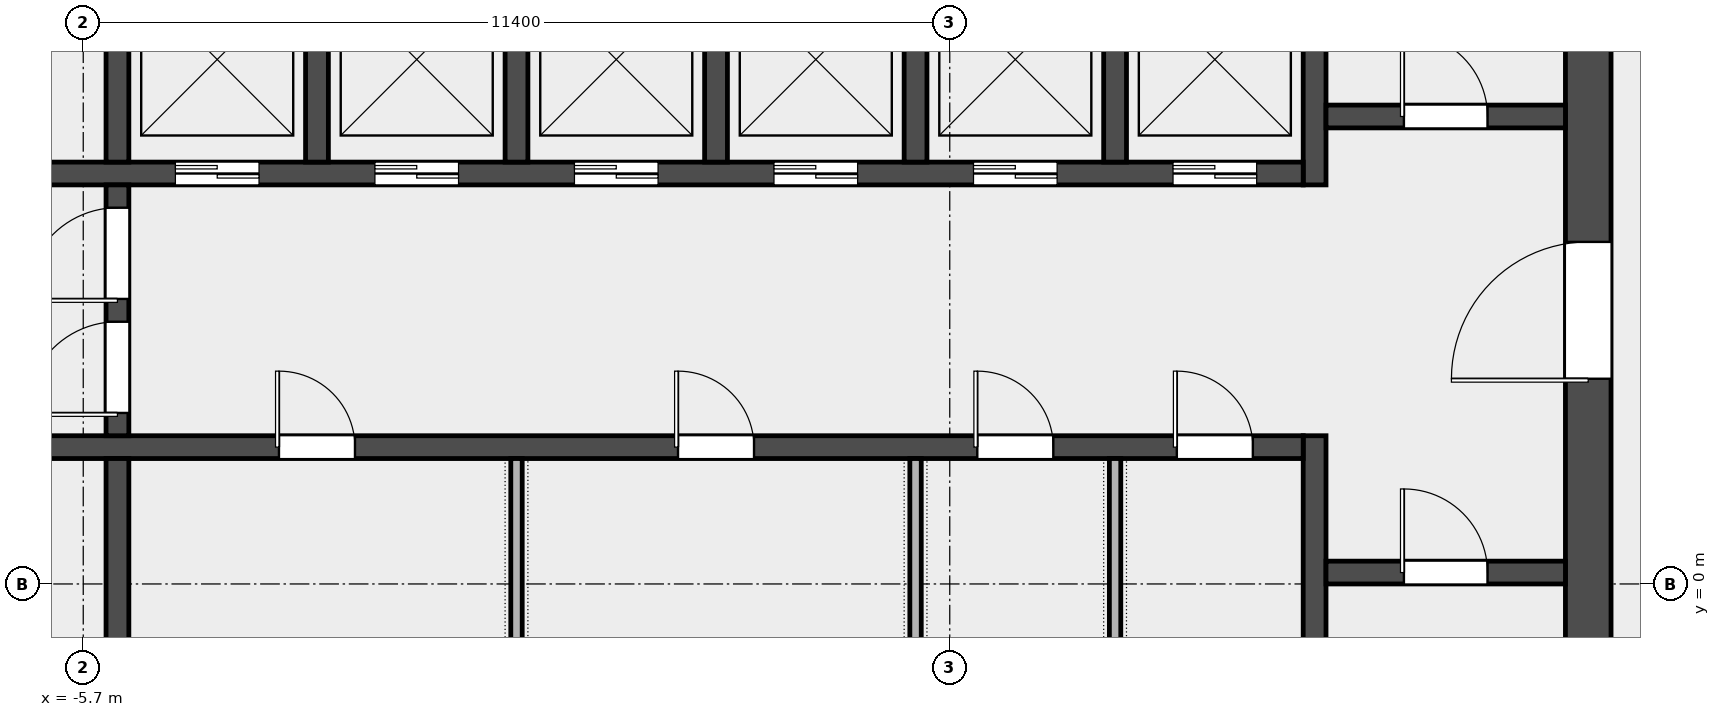
"""IFC4 building model, lengths in metres.
Left out: names, types, materials, properties, quantities, classifications, styles, units other than length and angle.
Written with IfcOpenShell. Run it as: python <this file> out.ifc"""

import sys

from ifc_helpers import new_model, si_unit, direction, frame, frame_2d, origin, place, context, subcontext, project, spatial, rectangle, extrude, element, fill, save


model = new_model("IFC4")
c1 = context("Model", 3, precision=1e-05, world=origin(), true_north=direction((0.0, 1.0)))
c2 = subcontext(c1, "Body", "Model", "MODEL_VIEW")
j1 = project(units=[si_unit("LENGTHUNIT", "METRE"), si_unit("PLANEANGLEUNIT", "RADIAN")], contexts=[c1])
p1 = place(None, origin())
s1 = spatial("IfcSite", under=j1, at=p1, CompositionType="ELEMENT")
p2 = place(p1, origin())
s2 = spatial("IfcBuilding", under=s1, at=p2, CompositionType="ELEMENT")
p3 = place(p2, frame((0.0, 0.0, 211.0)))
s3 = spatial("IfcBuildingStorey", under=s2, at=p3, CompositionType="ELEMENT", Elevation=211.0)
p4 = place(p3, frame((14.1, -6.6, 0.0), z_axis=(0.0, 0.0, 1.0), x_axis=(0.0, 1.0, 0.0)))
e1 = element("IfcWall", 1, at=p4, inside=s3, PredefinedType="SHEAR", context=c2, shape_type="SweptSolid", body=[
    extrude(rectangle(XDim=19.5, YDim=0.6, at=frame_2d((9.75, 0.0))), origin(), (0.0, 0.0, 1.0), 3.7),
])
p5 = place(p4, frame((9.3, 0.0, 0.0)))
e2 = element("IfcOpeningElement", 2, at=p5, cuts=e1, PredefinedType="OPENING", context=c2, shape_type="SweptSolid", body=[
    extrude(rectangle(XDim=1.8, YDim=2.1, at=frame_2d((0.9, 1.05))), frame((0.0, 0.312, 0.0), z_axis=(0.0, -1.0, 0.0), x_axis=(1.0, 0.0, 0.0)), (0.0, 0.0, 1.0), 0.624),
])
p6 = place(p3, frame((10.5, -6.6, 0.0), z_axis=(0.0, 0.0, 1.0), x_axis=(0.0, 1.0, 0.0)))
e3 = element("IfcWall", 3, at=p6, inside=s3, PredefinedType="SHEAR", context=c2, shape_type="SweptSolid", body=[
    extrude(rectangle(XDim=8.55, YDim=0.3, at=frame_2d((4.275, 0.0))), origin(), (0.0, 0.0, 1.0), 3.7),
])
p7 = place(p3, frame((10.5, 5.25, 0.0), z_axis=(0.0, 0.0, 1.0), x_axis=(0.0, 1.0, 0.0)))
e4 = element("IfcWall", 4, at=p7, inside=s3, PredefinedType="SHEAR", context=c2, shape_type="SweptSolid", body=[
    extrude(rectangle(XDim=7.65, YDim=0.3, at=frame_2d((3.825, 0.0))), origin(), (0.0, 0.0, 1.0), 3.7),
])
p8 = place(p3, frame((10.65, 0.15, 0.0), z_axis=(0.0, 0.0, 1.0), x_axis=(1.0, 0.0, 0.0)))
e5 = element("IfcWall", 5, at=p8, inside=s3, PredefinedType="SOLIDWALL", context=c2, shape_type="SweptSolid", body=[
    extrude(rectangle(XDim=3.15, YDim=0.3, at=frame_2d((1.575, 0.0))), origin(), (0.0, 0.0, 1.0), 3.7),
])
p9 = place(p8, frame((1.025, 0.0, 0.0)))
e6 = element("IfcOpeningElement", 6, at=p9, cuts=e5, PredefinedType="OPENING", context=c2, shape_type="SweptSolid", body=[
    extrude(rectangle(XDim=1.1, YDim=2.1, at=frame_2d((0.55, 1.05))), frame((0.0, 0.162, 0.0), z_axis=(0.0, -1.0, 0.0), x_axis=(1.0, 0.0, 0.0)), (0.0, 0.0, 1.0), 0.324),
])
p10 = place(p3, frame((10.65, 6.15, 0.0), z_axis=(0.0, 0.0, 1.0), x_axis=(1.0, 0.0, 0.0)))
e7 = element("IfcWall", 7, at=p10, inside=s3, PredefinedType="SOLIDWALL", context=c2, shape_type="SweptSolid", body=[
    extrude(rectangle(XDim=3.15, YDim=0.3, at=frame_2d((1.575, 0.0))), origin(), (0.0, 0.0, 1.0), 3.7),
])
p11 = place(p10, frame((1.025, 0.0, 0.0)))
e8 = element("IfcOpeningElement", 8, at=p11, cuts=e7, PredefinedType="OPENING", context=c2, shape_type="SweptSolid", body=[
    extrude(rectangle(XDim=1.1, YDim=2.1, at=frame_2d((0.55, 1.05))), frame((0.0, 0.162, 0.0), z_axis=(0.0, -1.0, 0.0), x_axis=(1.0, 0.0, 0.0)), (0.0, 0.0, 1.0), 0.324),
])
p12 = place(p3, frame((-10.35, 1.8, 0.0), z_axis=(0.0, 0.0, 1.0), x_axis=(1.0, 0.0, 0.0)))
e9 = element("IfcWall", 9, at=p12, inside=s3, PredefinedType="SOLIDWALL", context=c2, shape_type="SweptSolid", body=[
    extrude(rectangle(XDim=20.7, YDim=0.3, at=frame_2d((10.35, 0.0))), origin(), (0.0, 0.0, 1.0), 3.7),
])
p13 = place(p12, frame((0.512, 0.0, 0.0)))
e10 = element("IfcOpeningElement", 10, at=p13, cuts=e9, PredefinedType="OPENING", context=c2, shape_type="SweptSolid", body=[
    extrude(rectangle(XDim=1.3, YDim=2.1, at=frame_2d((0.65, 1.05))), frame((0.0, 0.162, 0.0), z_axis=(0.0, -1.0, 0.0), x_axis=(1.0, 0.0, 0.0)), (0.0, 0.0, 1.0), 0.324),
])
p14 = place(p12, frame((7.225, 0.0, 0.0)))
e11 = element("IfcOpeningElement", 11, at=p14, cuts=e9, PredefinedType="OPENING", context=c2, shape_type="SweptSolid", body=[
    extrude(rectangle(XDim=1.0, YDim=2.1, at=frame_2d((0.5, 1.05))), frame((0.0, 0.162, 0.0), z_axis=(0.0, -1.0, 0.0), x_axis=(1.0, 0.0, 0.0)), (0.0, 0.0, 1.0), 0.324),
])
p15 = place(p12, frame((12.475, 0.0, 0.0)))
e12 = element("IfcOpeningElement", 12, at=p15, cuts=e9, PredefinedType="OPENING", context=c2, shape_type="SweptSolid", body=[
    extrude(rectangle(XDim=1.0, YDim=2.1, at=frame_2d((0.5, 1.05))), frame((0.0, 0.162, 0.0), z_axis=(0.0, -1.0, 0.0), x_axis=(1.0, 0.0, 0.0)), (0.0, 0.0, 1.0), 0.324),
])
p16 = place(p12, frame((16.413, 0.0, 0.0)))
e13 = element("IfcOpeningElement", 13, at=p16, cuts=e9, PredefinedType="OPENING", context=c2, shape_type="SweptSolid", body=[
    extrude(rectangle(XDim=1.0, YDim=2.1, at=frame_2d((0.5, 1.05))), frame((0.0, 0.162, 0.0), z_axis=(0.0, -1.0, 0.0), x_axis=(1.0, 0.0, 0.0)), (0.0, 0.0, 1.0), 0.324),
])
p17 = place(p12, frame((19.038, 0.0, 0.0)))
e14 = element("IfcOpeningElement", 14, at=p17, cuts=e9, PredefinedType="OPENING", context=c2, shape_type="SweptSolid", body=[
    extrude(rectangle(XDim=1.0, YDim=2.1, at=frame_2d((0.5, 1.05))), frame((0.0, 0.162, 0.0), z_axis=(0.0, -1.0, 0.0), x_axis=(1.0, 0.0, 0.0)), (0.0, 0.0, 1.0), 0.324),
])
p18 = place(p3, frame((-10.35, 5.4, 0.0), z_axis=(0.0, 0.0, 1.0), x_axis=(1.0, 0.0, 0.0)))
e15 = element("IfcWall", 15, at=p18, inside=s3, PredefinedType="SOLIDWALL", context=c2, shape_type="SweptSolid", body=[
    extrude(rectangle(XDim=20.7, YDim=0.3, at=frame_2d((10.35, 0.0))), origin(), (0.0, 0.0, 1.0), 3.7),
])
p19 = place(p18, frame((0.512, 0.0, 0.0)))
e16 = element("IfcOpeningElement", 16, at=p19, cuts=e15, PredefinedType="OPENING", context=c2, shape_type="SweptSolid", body=[
    extrude(rectangle(XDim=1.3, YDim=2.1, at=frame_2d((0.65, 1.05))), frame((0.0, 0.162, 0.0), z_axis=(0.0, -1.0, 0.0), x_axis=(1.0, 0.0, 0.0)), (0.0, 0.0, 1.0), 0.324),
])
p20 = place(p18, frame((5.863, 0.0, 0.0)))
e17 = element("IfcOpeningElement", 17, at=p20, cuts=e15, PredefinedType="OPENING", context=c2, shape_type="SweptSolid", body=[
    extrude(rectangle(XDim=1.1, YDim=2.1, at=frame_2d((0.55, 1.05))), frame((0.0, 0.162, 0.0), z_axis=(0.0, -1.0, 0.0), x_axis=(1.0, 0.0, 0.0)), (0.0, 0.0, 1.0), 0.324),
])
p21 = place(p18, frame((8.488, 0.0, 0.0)))
e18 = element("IfcOpeningElement", 18, at=p21, cuts=e15, PredefinedType="OPENING", context=c2, shape_type="SweptSolid", body=[
    extrude(rectangle(XDim=1.1, YDim=2.1, at=frame_2d((0.55, 1.05))), frame((0.0, 0.162, 0.0), z_axis=(0.0, -1.0, 0.0), x_axis=(1.0, 0.0, 0.0)), (0.0, 0.0, 1.0), 0.324),
])
p22 = place(p18, frame((11.113, 0.0, 0.0)))
e19 = element("IfcOpeningElement", 19, at=p22, cuts=e15, PredefinedType="OPENING", context=c2, shape_type="SweptSolid", body=[
    extrude(rectangle(XDim=1.1, YDim=2.1, at=frame_2d((0.55, 1.05))), frame((0.0, 0.162, 0.0), z_axis=(0.0, -1.0, 0.0), x_axis=(1.0, 0.0, 0.0)), (0.0, 0.0, 1.0), 0.324),
])
p23 = place(p18, frame((13.738, 0.0, 0.0)))
e20 = element("IfcOpeningElement", 20, at=p23, cuts=e15, PredefinedType="OPENING", context=c2, shape_type="SweptSolid", body=[
    extrude(rectangle(XDim=1.1, YDim=2.1, at=frame_2d((0.55, 1.05))), frame((0.0, 0.162, 0.0), z_axis=(0.0, -1.0, 0.0), x_axis=(1.0, 0.0, 0.0)), (0.0, 0.0, 1.0), 0.324),
])
p24 = place(p18, frame((16.363, 0.0, 0.0)))
e21 = element("IfcOpeningElement", 21, at=p24, cuts=e15, PredefinedType="OPENING", context=c2, shape_type="SweptSolid", body=[
    extrude(rectangle(XDim=1.1, YDim=2.1, at=frame_2d((0.55, 1.05))), frame((0.0, 0.162, 0.0), z_axis=(0.0, -1.0, 0.0), x_axis=(1.0, 0.0, 0.0)), (0.0, 0.0, 1.0), 0.324),
])
p25 = place(p18, frame((18.988, 0.0, 0.0)))
e22 = element("IfcOpeningElement", 22, at=p25, cuts=e15, PredefinedType="OPENING", context=c2, shape_type="SweptSolid", body=[
    extrude(rectangle(XDim=1.1, YDim=2.1, at=frame_2d((0.55, 1.05))), frame((0.0, 0.162, 0.0), z_axis=(0.0, -1.0, 0.0), x_axis=(1.0, 0.0, 0.0)), (0.0, 0.0, 1.0), 0.324),
])
for number, where, z_axis, x_axis in (
    (23, (-5.25, -1.05, 0.0), (0.0, 0.0, 1.0), (0.0, 1.0, 0.0)),
    (24, (-5.25, 5.55, 0.0), (0.0, 0.0, 1.0), (0.0, 1.0, 0.0)),
    (25, (-2.625, 5.55, 0.0), (0.0, 0.0, 1.0), (0.0, 1.0, 0.0)),
    (26, (0.0, 5.55, 0.0), (0.0, 0.0, 1.0), (0.0, 1.0, 0.0)),
    (27, (2.625, 5.55, 0.0), (0.0, 0.0, 1.0), (0.0, 1.0, 0.0)),
    (28, (5.25, 5.55, 0.0), (0.0, 0.0, 1.0), (0.0, 1.0, 0.0)),
    (29, (7.875, 5.55, 0.0), (0.0, 0.0, 1.0), (0.0, 1.0, 0.0)),
):
    element("IfcWall", number, at=place(p3, frame(where, z_axis=z_axis, x_axis=x_axis)), inside=s3, PredefinedType="SOLIDWALL", context=c2, shape_type="SweptSolid", body=[
        extrude(rectangle(XDim=2.7, YDim=0.3, at=frame_2d((1.35, 0.0))), origin(), (0.0, 0.0, 1.0), 3.7),
    ])
p26 = place(p3, frame((-5.25, 1.95, 0.0), z_axis=(0.0, 0.0, 1.0), x_axis=(0.0, 1.0, 0.0)))
e30 = element("IfcWall", 30, at=p26, inside=s3, PredefinedType="SOLIDWALL", context=c2, shape_type="SweptSolid", body=[
    extrude(rectangle(XDim=3.3, YDim=0.3, at=frame_2d((1.65, 0.0))), origin(), (0.0, 0.0, 1.0), 3.7),
])
p27 = place(p26, frame((0.3, 0.0, 0.0)))
e31 = element("IfcOpeningElement", 31, at=p27, cuts=e30, PredefinedType="OPENING", context=c2, shape_type="SweptSolid", body=[
    extrude(rectangle(XDim=1.2, YDim=2.1, at=frame_2d((0.6, 1.05))), frame((0.0, 0.162, 0.0), z_axis=(0.0, -1.0, 0.0), x_axis=(1.0, 0.0, 0.0)), (0.0, 0.0, 1.0), 0.324),
])
p28 = place(p26, frame((1.8, 0.0, 0.0)))
e32 = element("IfcOpeningElement", 32, at=p28, cuts=e30, PredefinedType="OPENING", context=c2, shape_type="SweptSolid", body=[
    extrude(rectangle(XDim=1.2, YDim=2.1, at=frame_2d((0.6, 1.05))), frame((0.0, 0.162, 0.0), z_axis=(0.0, -1.0, 0.0), x_axis=(1.0, 0.0, 0.0)), (0.0, 0.0, 1.0), 0.324),
])
for number, where, z_axis, x_axis in (
    (33, (0.0, -1.05, 0.0), (0.0, 0.0, 1.0), (0.0, 1.0, 0.0)),
    (34, (5.25, -1.05, 0.0), (0.0, 0.0, 1.0), (0.0, 1.0, 0.0)),
    (35, (7.875, -1.05, 0.0), (0.0, 0.0, 1.0), (0.0, 1.0, 0.0)),
):
    element("IfcWall", number, at=place(p3, frame(where, z_axis=z_axis, x_axis=x_axis)), inside=s3, PredefinedType="PARTITIONING", context=c2, shape_type="SweptSolid", body=[
        extrude(rectangle(XDim=2.7, YDim=0.15, at=frame_2d((1.35, 0.0))), origin(), (0.0, 0.0, 1.0), 3.7),
    ])
p29 = place(p9, origin())
e36 = element("IfcDoor", 36, at=p29, inside=s3, OperationType="SINGLE_SWING_RIGHT", PredefinedType="DOOR", context=c2, shape_type="SweptSolid", body=[
    extrude(rectangle(XDim=1.1, YDim=2.1, at=frame_2d((0.55, 1.05))), frame((0.0, 0.025, 0.0), z_axis=(0.0, -1.0, 0.0), x_axis=(1.0, 0.0, 0.0)), (0.0, 0.0, 1.0), 0.05),
])
fill(e6, e36)
p30 = place(p11, origin())
e37 = element("IfcDoor", 37, at=p30, inside=s3, OperationType="SINGLE_SWING_RIGHT", PredefinedType="DOOR", context=c2, shape_type="SweptSolid", body=[
    extrude(rectangle(XDim=1.1, YDim=2.1, at=frame_2d((0.55, 1.05))), frame((0.0, 0.025, 0.0), z_axis=(0.0, -1.0, 0.0), x_axis=(1.0, 0.0, 0.0)), (0.0, 0.0, 1.0), 0.05),
])
fill(e8, e37)
p31 = place(p5, origin())
e38 = element("IfcDoor", 38, at=p31, inside=s3, OperationType="DOUBLE_DOOR_SINGLE_SWING", PredefinedType="DOOR", context=c2, shape_type="SweptSolid", body=[
    extrude(rectangle(XDim=1.8, YDim=2.1, at=frame_2d((0.9, 1.05))), frame((0.0, 0.025, 0.0), z_axis=(0.0, -1.0, 0.0), x_axis=(1.0, 0.0, 0.0)), (0.0, 0.0, 1.0), 0.05),
])
fill(e2, e38)
p32 = place(p27, origin())
e39 = element("IfcDoor", 39, at=p32, inside=s3, OperationType="SINGLE_SWING_LEFT", PredefinedType="DOOR", context=c2, shape_type="SweptSolid", body=[
    extrude(rectangle(XDim=1.2, YDim=2.1, at=frame_2d((0.6, 1.05))), frame((0.0, 0.025, 0.0), z_axis=(0.0, -1.0, 0.0), x_axis=(1.0, 0.0, 0.0)), (0.0, 0.0, 1.0), 0.05),
])
fill(e31, e39)
p33 = place(p28, origin())
e40 = element("IfcDoor", 40, at=p33, inside=s3, OperationType="SINGLE_SWING_RIGHT", PredefinedType="DOOR", context=c2, shape_type="SweptSolid", body=[
    extrude(rectangle(XDim=1.2, YDim=2.1, at=frame_2d((0.6, 1.05))), frame((0.0, 0.025, 0.0), z_axis=(0.0, -1.0, 0.0), x_axis=(1.0, 0.0, 0.0)), (0.0, 0.0, 1.0), 0.05),
])
fill(e32, e40)
p34 = place(p20, origin())
e41 = element("IfcDoor", 41, at=p34, inside=s3, OperationType="DOUBLE_DOOR_SLIDING", PredefinedType="DOOR", context=c2, shape_type="SweptSolid", body=[
    extrude(rectangle(XDim=1.1, YDim=2.1, at=frame_2d((0.55, 1.05))), frame((0.0, 0.025, 0.0), z_axis=(0.0, -1.0, 0.0), x_axis=(1.0, 0.0, 0.0)), (0.0, 0.0, 1.0), 0.05),
])
fill(e17, e41)
p35 = place(p21, origin())
e42 = element("IfcDoor", 42, at=p35, inside=s3, OperationType="DOUBLE_DOOR_SLIDING", PredefinedType="DOOR", context=c2, shape_type="SweptSolid", body=[
    extrude(rectangle(XDim=1.1, YDim=2.1, at=frame_2d((0.55, 1.05))), frame((0.0, 0.025, 0.0), z_axis=(0.0, -1.0, 0.0), x_axis=(1.0, 0.0, 0.0)), (0.0, 0.0, 1.0), 0.05),
])
fill(e18, e42)
p36 = place(p22, origin())
e43 = element("IfcDoor", 43, at=p36, inside=s3, OperationType="DOUBLE_DOOR_SLIDING", PredefinedType="DOOR", context=c2, shape_type="SweptSolid", body=[
    extrude(rectangle(XDim=1.1, YDim=2.1, at=frame_2d((0.55, 1.05))), frame((0.0, 0.025, 0.0), z_axis=(0.0, -1.0, 0.0), x_axis=(1.0, 0.0, 0.0)), (0.0, 0.0, 1.0), 0.05),
])
fill(e19, e43)
p37 = place(p23, origin())
e44 = element("IfcDoor", 44, at=p37, inside=s3, OperationType="DOUBLE_DOOR_SLIDING", PredefinedType="DOOR", context=c2, shape_type="SweptSolid", body=[
    extrude(rectangle(XDim=1.1, YDim=2.1, at=frame_2d((0.55, 1.05))), frame((0.0, 0.025, 0.0), z_axis=(0.0, -1.0, 0.0), x_axis=(1.0, 0.0, 0.0)), (0.0, 0.0, 1.0), 0.05),
])
fill(e20, e44)
p38 = place(p24, origin())
e45 = element("IfcDoor", 45, at=p38, inside=s3, OperationType="DOUBLE_DOOR_SLIDING", PredefinedType="DOOR", context=c2, shape_type="SweptSolid", body=[
    extrude(rectangle(XDim=1.1, YDim=2.1, at=frame_2d((0.55, 1.05))), frame((0.0, 0.025, 0.0), z_axis=(0.0, -1.0, 0.0), x_axis=(1.0, 0.0, 0.0)), (0.0, 0.0, 1.0), 0.05),
])
fill(e21, e45)
p39 = place(p25, origin())
e46 = element("IfcDoor", 46, at=p39, inside=s3, OperationType="DOUBLE_DOOR_SLIDING", PredefinedType="DOOR", context=c2, shape_type="SweptSolid", body=[
    extrude(rectangle(XDim=1.1, YDim=2.1, at=frame_2d((0.55, 1.05))), frame((0.0, 0.025, 0.0), z_axis=(0.0, -1.0, 0.0), x_axis=(1.0, 0.0, 0.0)), (0.0, 0.0, 1.0), 0.05),
])
fill(e22, e46)
p40 = place(p14, origin())
e47 = element("IfcDoor", 47, at=p40, inside=s3, OperationType="SINGLE_SWING_LEFT", PredefinedType="DOOR", context=c2, shape_type="SweptSolid", body=[
    extrude(rectangle(XDim=1.0, YDim=2.1, at=frame_2d((0.5, 1.05))), frame((0.0, 0.025, 0.0), z_axis=(0.0, -1.0, 0.0), x_axis=(1.0, 0.0, 0.0)), (0.0, 0.0, 1.0), 0.05),
])
fill(e11, e47)
p41 = place(p15, origin())
e48 = element("IfcDoor", 48, at=p41, inside=s3, OperationType="SINGLE_SWING_LEFT", PredefinedType="DOOR", context=c2, shape_type="SweptSolid", body=[
    extrude(rectangle(XDim=1.0, YDim=2.1, at=frame_2d((0.5, 1.05))), frame((0.0, 0.025, 0.0), z_axis=(0.0, -1.0, 0.0), x_axis=(1.0, 0.0, 0.0)), (0.0, 0.0, 1.0), 0.05),
])
fill(e12, e48)
p42 = place(p16, origin())
e49 = element("IfcDoor", 49, at=p42, inside=s3, OperationType="SINGLE_SWING_LEFT", PredefinedType="DOOR", context=c2, shape_type="SweptSolid", body=[
    extrude(rectangle(XDim=1.0, YDim=2.1, at=frame_2d((0.5, 1.05))), frame((0.0, 0.025, 0.0), z_axis=(0.0, -1.0, 0.0), x_axis=(1.0, 0.0, 0.0)), (0.0, 0.0, 1.0), 0.05),
])
fill(e13, e49)
p43 = place(p17, origin())
e50 = element("IfcDoor", 50, at=p43, inside=s3, OperationType="SINGLE_SWING_LEFT", PredefinedType="DOOR", context=c2, shape_type="SweptSolid", body=[
    extrude(rectangle(XDim=1.0, YDim=2.1, at=frame_2d((0.5, 1.05))), frame((0.0, 0.025, 0.0), z_axis=(0.0, -1.0, 0.0), x_axis=(1.0, 0.0, 0.0)), (0.0, 0.0, 1.0), 0.05),
])
fill(e14, e50)
save(model, sys.argv[1])
